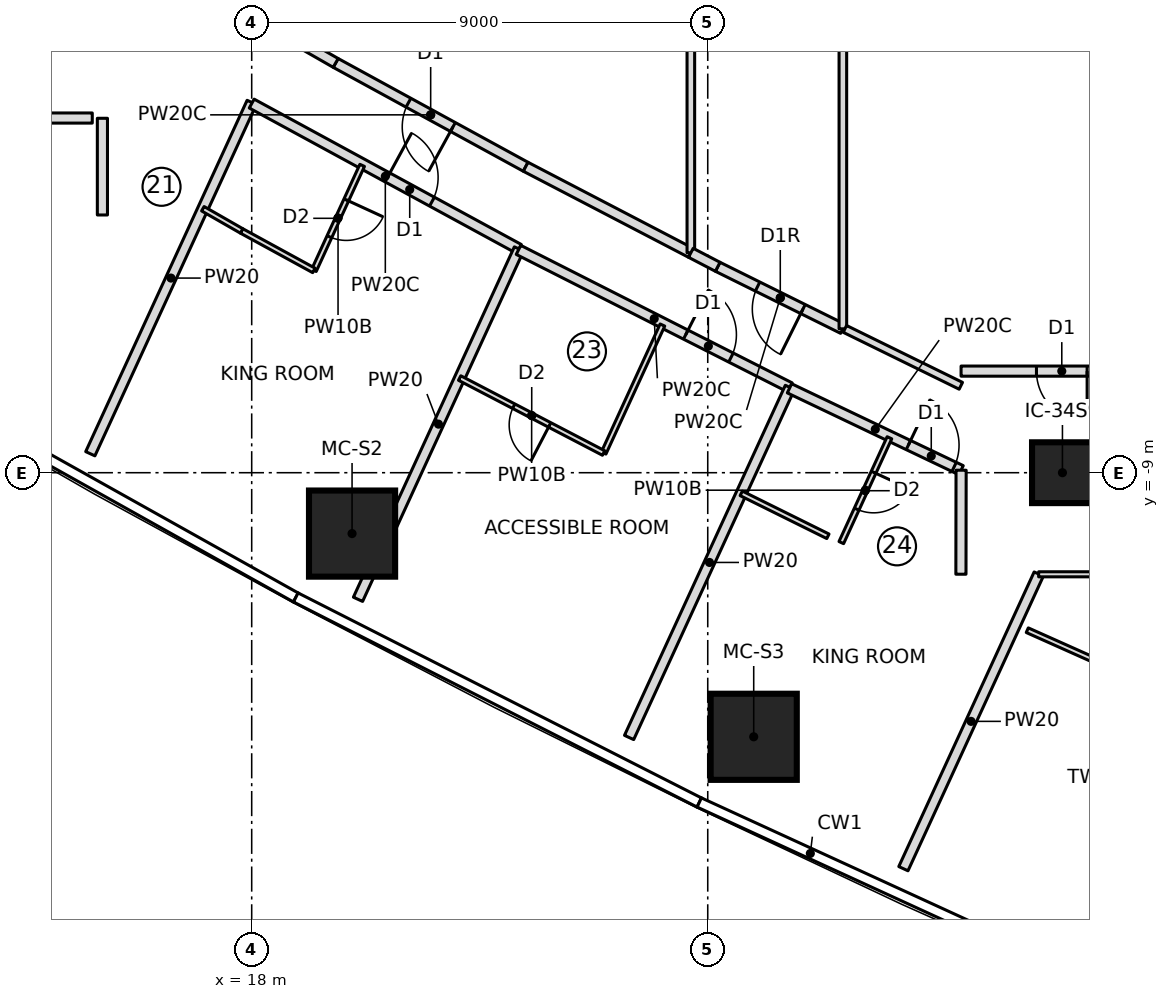
"""IFC4 building model, lengths in metres.
Left out: names, types, materials, properties, quantities, classifications, styles, units other than length and angle.
Written with IfcOpenShell. Run it as: python <this file> out.ifc"""

import sys

from ifc_helpers import new_model, si_unit, direction, frame, frame_2d, origin, origin_2d, place, context, subcontext, project, spatial, rectangle, extrude, element, fill, save


model = new_model("IFC4")
c1 = context("Model", 3, precision=1e-05, world=origin(), true_north=direction((0.0, 1.0)))
c2 = subcontext(c1, "Body", "Model", "MODEL_VIEW")
j1 = project(units=[si_unit("LENGTHUNIT", "METRE"), si_unit("PLANEANGLEUNIT", "RADIAN")], contexts=[c1])
p1 = place(None, origin())
s1 = spatial("IfcSite", under=j1, at=p1, CompositionType="ELEMENT")
p2 = place(p1, origin())
s2 = spatial("IfcBuilding", under=s1, at=p2, CompositionType="ELEMENT")
p3 = place(p2, frame((0.0, 0.0, 106.2)))
s3 = spatial("IfcBuildingStorey", under=s2, at=p3, CompositionType="ELEMENT", Elevation=106.2)
for number, where, z_axis, x_axis in (
    (1, (19.981, -10.202, 0.0), (0.0, 0.0, 1.0), (1.0, 0.0, 0.0)),
    (2, (27.907, -14.212, 0.0), (0.0, 0.0, 1.0), (1.0, 0.0, 0.0)),
):
    element("IfcColumn", number, at=place(p3, frame(where, z_axis=z_axis, x_axis=x_axis)), inside=s3, PredefinedType="COLUMN", context=c2, shape_type="SweptSolid", body=[
        extrude(rectangle(XDim=1.7, YDim=1.7, at=origin_2d()), origin(), (0.0, 0.0, 1.0), 3.55),
    ])
p4 = place(p3, frame((34.0, -9.0, 0.0), z_axis=(0.0, 0.0, 1.0), x_axis=(1.0, 0.0, 0.0)))
e3 = element("IfcColumn", 3, at=p4, inside=s3, PredefinedType="COLUMN", context=c2, shape_type="SweptSolid", body=[
    extrude(rectangle(XDim=1.2, YDim=1.2, at=origin_2d()), origin(), (0.0, 0.0, 1.0), 3.55),
])
p5 = place(p3, frame((5.145, -2.0, 0.0), z_axis=(0.0, 0.0, 1.0), x_axis=(1.0, 0.0, 0.0)))
e4 = element("IfcWall", 4, at=p5, inside=s3, PredefinedType="PARTITIONING", context=c2, shape_type="SweptSolid", body=[
    extrude(rectangle(XDim=9.709, YDim=0.2, at=frame_2d((4.854, 0.0))), origin(), (0.0, 0.0, 1.0), 3.25),
])
p6 = place(p5, frame((4.625, 0.0, 0.0)))
e5 = element("IfcOpeningElement", 5, at=p6, cuts=e4, PredefinedType="OPENING", context=c2, shape_type="SweptSolid", body=[
    extrude(rectangle(XDim=1.0, YDim=2.1, at=frame_2d((0.5, 1.05))), frame((0.0, 0.11, 0.0), z_axis=(0.0, -1.0, 0.0), x_axis=(1.0, 0.0, 0.0)), (0.0, 0.0, 1.0), 0.22),
])
p7 = place(p3, frame((14.815, -8.626, 0.0), z_axis=(0.0, 0.0, 1.0), x_axis=(0.417432341259, 0.908708006166, 0.0)))
e6 = element("IfcWall", 6, at=p7, inside=s3, PredefinedType="PARTITIONING", context=c2, shape_type="SweptSolid", body=[
    extrude(rectangle(XDim=7.631, YDim=0.2, at=frame_2d((3.815, 0.0))), origin(), (0.0, 0.0, 1.0), 3.25),
])
p8 = place(p3, frame((18.0, -1.715, 0.0), z_axis=(0.0, 0.0, 1.0), x_axis=(0.878415628048, -0.477897462225, 0.0)))
e7 = element("IfcWall", 7, at=p8, inside=s3, PredefinedType="PARTITIONING", context=c2, shape_type="SweptSolid", body=[
    extrude(rectangle(XDim=6.004, YDim=0.2, at=frame_2d((3.002, 0.0))), origin(), (0.0, 0.0, 1.0), 3.25),
])
p9 = place(p8, frame((3.05, 0.0, 0.0)))
e8 = element("IfcOpeningElement", 8, at=p9, cuts=e7, PredefinedType="OPENING", context=c2, shape_type="SweptSolid", body=[
    extrude(rectangle(XDim=1.0, YDim=2.1, at=frame_2d((0.5, 1.05))), frame((0.0, 0.11, 0.0), z_axis=(0.0, -1.0, 0.0), x_axis=(1.0, 0.0, 0.0)), (0.0, 0.0, 1.0), 0.22),
])
p10 = place(p3, frame((20.18, -2.934, 0.0), z_axis=(0.0, 0.0, 1.0), x_axis=(-0.417450047292, -0.908699872354, 0.0)))
e9 = element("IfcWall", 9, at=p10, inside=s3, PredefinedType="PARTITIONING", context=c2, shape_type="SweptSolid", body=[
    extrude(rectangle(XDim=2.283, YDim=0.1, at=frame_2d((1.141, 0.0))), origin(), (0.0, 0.0, 1.0), 3.25),
])
p11 = place(p10, frame((0.75, 0.0, 0.0)))
e10 = element("IfcOpeningElement", 10, at=p11, cuts=e9, PredefinedType="OPENING", context=c2, shape_type="SweptSolid", body=[
    extrude(rectangle(XDim=0.8, YDim=2.1, at=frame_2d((0.4, 1.05))), frame((0.0, 0.06, 0.0), z_axis=(0.0, -1.0, 0.0), x_axis=(1.0, 0.0, 0.0)), (0.0, 0.0, 1.0), 0.12),
])
p12 = place(p3, frame((19.228, -5.008, 0.0), z_axis=(0.0, 0.0, 1.0), x_axis=(-0.877424481957, 0.479714788663, 0.0)))
e11 = element("IfcWall", 11, at=p12, inside=s3, PredefinedType="PARTITIONING", context=c2, shape_type="SweptSolid", body=[
    extrude(rectangle(XDim=1.625, YDim=0.1, at=frame_2d((0.813, 0.0))), origin(), (0.0, 0.0, 1.0), 3.25),
])
p13 = place(p3, frame((17.801, -4.229, 0.0), z_axis=(0.0, 0.0, 1.0), x_axis=(-0.867629162742, 0.497211862248, 0.0)))
e12 = element("IfcWall", 12, at=p13, inside=s3, PredefinedType="PARTITIONING", context=c2, shape_type="SweptSolid", body=[
    extrude(rectangle(XDim=0.882, YDim=0.1, at=frame_2d((0.441, 0.0))), origin(), (0.0, 0.0, 1.0), 3.25),
])
p14 = place(p3, frame((20.098, -11.499, 0.0), z_axis=(0.0, 0.0, 1.0), x_axis=(0.417440028355, 0.908704474913, 0.0)))
e13 = element("IfcWall", 13, at=p14, inside=s3, PredefinedType="PARTITIONING", context=c2, shape_type="SweptSolid", body=[
    extrude(rectangle(XDim=7.61, YDim=0.2, at=frame_2d((3.805, 0.0))), origin(), (0.0, 0.0, 1.0), 3.25),
])
p15 = place(p3, frame((23.266, -4.602, 0.0), z_axis=(0.0, 0.0, 1.0), x_axis=(0.892007141151, -0.452021304958, 0.0)))
e14 = element("IfcWall", 14, at=p15, inside=s3, PredefinedType="PARTITIONING", context=c2, shape_type="SweptSolid", body=[
    extrude(rectangle(XDim=6.004, YDim=0.2, at=frame_2d((3.002, 0.0))), origin(), (0.0, 0.0, 1.0), 3.25),
])
p16 = place(p15, frame((3.7, 0.0, 0.0)))
e15 = element("IfcOpeningElement", 15, at=p16, cuts=e14, PredefinedType="OPENING", context=c2, shape_type="SweptSolid", body=[
    extrude(rectangle(XDim=1.0, YDim=2.1, at=frame_2d((0.5, 1.05))), frame((0.0, 0.11, 0.0), z_axis=(0.0, -1.0, 0.0), x_axis=(1.0, 0.0, 0.0)), (0.0, 0.0, 1.0), 0.22),
])
p17 = place(p3, frame((26.106, -6.085, 0.0), z_axis=(0.0, 0.0, 1.0), x_axis=(-0.417431588167, -0.908708352113, 0.0)))
e16 = element("IfcWall", 16, at=p17, inside=s3, PredefinedType="PARTITIONING", context=c2, shape_type="SweptSolid", body=[
    extrude(rectangle(XDim=2.781, YDim=0.1, at=frame_2d((1.39, 0.0))), origin(), (0.0, 0.0, 1.0), 3.25),
])
p18 = place(p3, frame((24.945, -8.612, 0.0), z_axis=(0.0, 0.0, 1.0), x_axis=(-0.886865947566, 0.46202682936, 0.0)))
e17 = element("IfcWall", 17, at=p18, inside=s3, PredefinedType="PARTITIONING", context=c2, shape_type="SweptSolid", body=[
    extrude(rectangle(XDim=3.204, YDim=0.1, at=frame_2d((1.602, 0.0))), origin(), (0.0, 0.0, 1.0), 3.25),
])
p19 = place(p18, frame((1.2, 0.0, 0.0)))
e18 = element("IfcOpeningElement", 18, at=p19, cuts=e17, PredefinedType="OPENING", context=c2, shape_type="SweptSolid", body=[
    extrude(rectangle(XDim=0.8, YDim=2.1, at=frame_2d((0.4, 1.05))), frame((0.0, 0.06, 0.0), z_axis=(0.0, -1.0, 0.0), x_axis=(1.0, 0.0, 0.0)), (0.0, 0.0, 1.0), 0.12),
])
p20 = place(p3, frame((25.448, -14.226, 0.0), z_axis=(0.0, 0.0, 1.0), x_axis=(0.417428513692, 0.908709764422, 0.0)))
e19 = element("IfcWall", 19, at=p20, inside=s3, PredefinedType="PARTITIONING", context=c2, shape_type="SweptSolid", body=[
    extrude(rectangle(XDim=7.603, YDim=0.2, at=frame_2d((3.802, 0.0))), origin(), (0.0, 0.0, 1.0), 3.25),
])
p21 = place(p3, frame((28.613, -7.335, 0.0), z_axis=(0.0, 0.0, 1.0), x_axis=(0.902499429765, -0.430691048518, 0.0)))
e20 = element("IfcWall", 20, at=p21, inside=s3, PredefinedType="PARTITIONING", context=c2, shape_type="SweptSolid", body=[
    extrude(rectangle(XDim=3.753, YDim=0.2, at=frame_2d((1.876, 0.0))), origin(), (0.0, 0.0, 1.0), 3.25),
])
p22 = place(p21, frame((2.6, 0.0, 0.0)))
e21 = element("IfcOpeningElement", 21, at=p22, cuts=e20, PredefinedType="OPENING", context=c2, shape_type="SweptSolid", body=[
    extrude(rectangle(XDim=1.0, YDim=2.1, at=frame_2d((0.5, 1.05))), frame((0.0, 0.11, 0.0), z_axis=(0.0, -1.0, 0.0), x_axis=(1.0, 0.0, 0.0)), (0.0, 0.0, 1.0), 0.22),
])
p23 = place(p3, frame((30.586, -8.31, 0.0), z_axis=(0.0, 0.0, 1.0), x_axis=(-0.417466676952, -0.908692232626, 0.0)))
e22 = element("IfcWall", 22, at=p23, inside=s3, PredefinedType="PARTITIONING", context=c2, shape_type="SweptSolid", body=[
    extrude(rectangle(XDim=2.277, YDim=0.1, at=frame_2d((1.139, 0.0))), origin(), (0.0, 0.0, 1.0), 3.25),
])
p24 = place(p23, frame((0.75, 0.0, 0.0)))
e23 = element("IfcOpeningElement", 23, at=p24, cuts=e22, PredefinedType="OPENING", context=c2, shape_type="SweptSolid", body=[
    extrude(rectangle(XDim=0.8, YDim=2.1, at=frame_2d((0.4, 1.05))), frame((0.0, 0.06, 0.0), z_axis=(0.0, -1.0, 0.0), x_axis=(1.0, 0.0, 0.0)), (0.0, 0.0, 1.0), 0.12),
])
p25 = place(p3, frame((29.371, -10.255, 0.0), z_axis=(0.0, 0.0, 1.0), x_axis=(-0.895982200486, 0.444089964324, 0.0)))
e24 = element("IfcWall", 24, at=p25, inside=s3, PredefinedType="PARTITIONING", context=c2, shape_type="SweptSolid", body=[
    extrude(rectangle(XDim=1.909, YDim=0.1, at=frame_2d((0.954, 0.0))), origin(), (0.0, 0.0, 1.0), 3.25),
])
p26 = place(p3, frame((30.861, -16.815, 0.0), z_axis=(0.0, 0.0, 1.0), x_axis=(0.417441426461, 0.908703832651, 0.0)))
e25 = element("IfcWall", 25, at=p26, inside=s3, PredefinedType="PARTITIONING", context=c2, shape_type="SweptSolid", body=[
    extrude(rectangle(XDim=6.399, YDim=0.2, at=frame_2d((3.2, 0.0))), origin(), (0.0, 0.0, 1.0), 3.25),
])
p27 = place(p3, frame((35.354, -13.023, 0.0), z_axis=(0.0, 0.0, 1.0), x_axis=(-0.913060453705, 0.407824236504, 0.0)))
e26 = element("IfcWall", 26, at=p27, inside=s3, PredefinedType="PARTITIONING", context=c2, shape_type="SweptSolid", body=[
    extrude(rectangle(XDim=2.243, YDim=0.1, at=frame_2d((1.122, 0.0))), origin(), (0.0, 0.0, 1.0), 3.25),
])
p28 = place(p3, frame((23.407, -2.962, 0.0), z_axis=(0.0, 0.0, 1.0), x_axis=(-0.877465075585, 0.479640533242, 0.0)))
e27 = element("IfcWall", 27, at=p28, inside=s3, PredefinedType="PARTITIONING", context=c2, shape_type="SweptSolid", body=[
    extrude(rectangle(XDim=4.273, YDim=0.2, at=frame_2d((2.137, 0.0))), origin(), (0.0, 0.0, 1.0), 3.25),
])
p29 = place(p28, frame((1.636, 0.0, 0.0)))
e28 = element("IfcOpeningElement", 28, at=p29, cuts=e27, PredefinedType="OPENING", context=c2, shape_type="SweptSolid", body=[
    extrude(rectangle(XDim=1.0, YDim=2.1, at=frame_2d((0.5, 1.05))), frame((0.0, 0.11, 0.0), z_axis=(0.0, -1.0, 0.0), x_axis=(1.0, 0.0, 0.0)), (0.0, 0.0, 1.0), 0.22),
])
p30 = place(p3, frame((19.657, -0.912, 0.0), z_axis=(0.0, 0.0, 1.0), x_axis=(-0.867694156962, 0.49709843087, 0.0)))
e29 = element("IfcWall", 29, at=p30, inside=s3, PredefinedType="PARTITIONING", context=c2, shape_type="SweptSolid", body=[
    extrude(rectangle(XDim=1.835, YDim=0.2, at=frame_2d((0.918, 0.0))), origin(), (0.0, 0.0, 1.0), 3.25),
])
p31 = place(p3, frame((26.667, -4.66, 0.0), z_axis=(0.0, 0.0, 1.0), x_axis=(-0.886891405098, 0.46197796004, 0.0)))
e30 = element("IfcWall", 30, at=p31, inside=s3, PredefinedType="PARTITIONING", context=c2, shape_type="SweptSolid", body=[
    extrude(rectangle(XDim=3.676, YDim=0.2, at=frame_2d((1.838, 0.0))), origin(), (0.0, 0.0, 1.0), 3.25),
])
p32 = place(p3, frame((26.667, -4.66, 0.0), z_axis=(0.0, 0.0, 1.0), x_axis=(0.0, 1.0, 0.0)))
e31 = element("IfcWall", 31, at=p32, inside=s3, PredefinedType="PARTITIONING", context=c2, shape_type="SweptSolid", body=[
    extrude(rectangle(XDim=9.32, YDim=0.15, at=frame_2d((4.66, 0.0))), origin(), (0.0, 0.0, 1.0), 3.25),
])
p33 = place(p3, frame((29.667, -6.16, 0.0), z_axis=(0.0, 0.0, 1.0), x_axis=(-0.895945057464, 0.444164895062, 0.0)))
e32 = element("IfcWall", 32, at=p33, inside=s3, PredefinedType="PARTITIONING", context=c2, shape_type="SweptSolid", body=[
    extrude(rectangle(XDim=2.757, YDim=0.2, at=frame_2d((1.378, 0.0))), origin(), (0.0, 0.0, 1.0), 3.25),
])
p34 = place(p33, frame((0.878, 0.0, 0.0)))
e33 = element("IfcOpeningElement", 33, at=p34, cuts=e32, PredefinedType="OPENING", context=c2, shape_type="SweptSolid", body=[
    extrude(rectangle(XDim=1.0, YDim=2.1, at=frame_2d((0.5, 1.05))), frame((0.0, 0.11, 0.0), z_axis=(0.0, -1.0, 0.0), x_axis=(1.0, 0.0, 0.0)), (0.0, 0.0, 1.0), 0.22),
])
p35 = place(p3, frame((29.667, -6.16, 0.0), z_axis=(0.0, 0.0, 1.0), x_axis=(0.0, 1.0, 0.0)))
e34 = element("IfcWall", 34, at=p35, inside=s3, PredefinedType="PARTITIONING", context=c2, shape_type="SweptSolid", body=[
    extrude(rectangle(XDim=12.321, YDim=0.15, at=frame_2d((6.16, 0.0))), origin(), (0.0, 0.0, 1.0), 3.25),
])
p36 = place(p3, frame((35.975, -6.995, 0.0), z_axis=(0.0, 0.0, 1.0), x_axis=(-1.0, 0.0, 0.0)))
e35 = element("IfcWall", 35, at=p36, inside=s3, PredefinedType="PARTITIONING", context=c2, shape_type="SweptSolid", body=[
    extrude(rectangle(XDim=3.975, YDim=0.2, at=frame_2d((1.988, 0.0))), origin(), (0.0, 0.0, 1.0), 3.25),
])
p37 = place(p36, frame((1.488, 0.0, 0.0)))
e36 = element("IfcOpeningElement", 36, at=p37, cuts=e35, PredefinedType="OPENING", context=c2, shape_type="SweptSolid", body=[
    extrude(rectangle(XDim=1.0, YDim=2.1, at=frame_2d((0.5, 1.05))), frame((0.0, 0.11, 0.0), z_axis=(0.0, -1.0, 0.0), x_axis=(1.0, 0.0, 0.0)), (0.0, 0.0, 1.0), 0.22),
])
p38 = place(p3, frame((33.53, -11.005, 0.0), z_axis=(0.0, 0.0, 1.0), x_axis=(1.0, 0.0, 0.0)))
e37 = element("IfcWall", 37, at=p38, inside=s3, PredefinedType="PARTITIONING", context=c2, shape_type="SweptSolid", body=[
    extrude(rectangle(XDim=2.47, YDim=0.1, at=frame_2d((1.235, 0.0))), origin(), (0.0, 0.0, 1.0), 3.25),
])
p39 = place(p3, frame((31.995, -7.285, 0.0), z_axis=(0.0, 0.0, 1.0), x_axis=(-0.89773510237, 0.440535680702, 0.0)))
e38 = element("IfcWall", 38, at=p39, inside=s3, PredefinedType="PARTITIONING", context=c2, shape_type="SweptSolid", body=[
    extrude(rectangle(XDim=2.549, YDim=0.15, at=frame_2d((1.275, 0.0))), origin(), (0.0, 0.0, 1.0), 3.25),
])
p40 = place(p3, frame((15.054, -2.005, 0.0), z_axis=(0.0, 0.0, 1.0), x_axis=(0.0, -1.0, 0.0)))
e39 = element("IfcWall", 39, at=p40, inside=s3, PredefinedType="PARTITIONING", context=c2, shape_type="SweptSolid", body=[
    extrude(rectangle(XDim=1.908, YDim=0.2, at=frame_2d((0.954, 0.0))), origin(), (0.0, 0.0, 1.0), 3.25),
])
p41 = place(p3, frame((32.0, -8.951, 0.0), z_axis=(0.0, 0.0, 1.0), x_axis=(-0.001665276625, -0.999998613426, 0.0)))
e40 = element("IfcWall", 40, at=p41, inside=s3, PredefinedType="PARTITIONING", context=c2, shape_type="SweptSolid", body=[
    extrude(rectangle(XDim=2.052, YDim=0.2, at=frame_2d((1.026, 0.0))), origin(), (0.0, 0.0, 1.0), 3.25),
])
p42 = place(p3, frame((27.196, -4.936, 0.0), z_axis=(0.0, 0.0, 1.0), x_axis=(-0.886948968309, 0.46186743511, 0.0)))
e41 = element("IfcWall", 41, at=p42, inside=s3, PredefinedType="PARTITIONING", context=c2, shape_type="SweptSolid", body=[
    extrude(rectangle(XDim=0.597, YDim=0.2, at=frame_2d((0.299, 0.0))), origin(), (0.0, 0.0, 1.0), 3.25),
])
p43 = place(p11, origin())
e42 = element("IfcDoor", 42, at=p43, inside=s3, OperationType="SINGLE_SWING_LEFT", PredefinedType="DOOR", context=c2, shape_type="SweptSolid", body=[
    extrude(rectangle(XDim=0.8, YDim=2.1, at=frame_2d((0.4, 1.05))), frame((0.0, 0.025, 0.0), z_axis=(0.0, -1.0, 0.0), x_axis=(1.0, 0.0, 0.0)), (0.0, 0.0, 1.0), 0.05),
])
fill(e10, e42)
p44 = place(p9, origin())
e43 = element("IfcDoor", 43, at=p44, inside=s3, OperationType="SINGLE_SWING_LEFT", PredefinedType="DOOR", context=c2, shape_type="SweptSolid", body=[
    extrude(rectangle(XDim=1.0, YDim=2.1, at=frame_2d((0.5, 1.05))), frame((0.0, 0.025, 0.0), z_axis=(0.0, -1.0, 0.0), x_axis=(1.0, 0.0, 0.0)), (0.0, 0.0, 1.0), 0.05),
])
fill(e8, e43)
p45 = place(p19, origin())
e44 = element("IfcDoor", 44, at=p45, inside=s3, OperationType="SINGLE_SWING_LEFT", PredefinedType="DOOR", context=c2, shape_type="SweptSolid", body=[
    extrude(rectangle(XDim=0.8, YDim=2.1, at=frame_2d((0.4, 1.05))), frame((0.0, 0.025, 0.0), z_axis=(0.0, -1.0, 0.0), x_axis=(1.0, 0.0, 0.0)), (0.0, 0.0, 1.0), 0.05),
])
fill(e18, e44)
p46 = place(p16, origin())
e45 = element("IfcDoor", 45, at=p46, inside=s3, OperationType="SINGLE_SWING_LEFT", PredefinedType="DOOR", context=c2, shape_type="SweptSolid", body=[
    extrude(rectangle(XDim=1.0, YDim=2.1, at=frame_2d((0.5, 1.05))), frame((0.0, 0.025, 0.0), z_axis=(0.0, -1.0, 0.0), x_axis=(1.0, 0.0, 0.0)), (0.0, 0.0, 1.0), 0.05),
])
fill(e15, e45)
p47 = place(p24, origin())
e46 = element("IfcDoor", 46, at=p47, inside=s3, OperationType="SINGLE_SWING_LEFT", PredefinedType="DOOR", context=c2, shape_type="SweptSolid", body=[
    extrude(rectangle(XDim=0.8, YDim=2.1, at=frame_2d((0.4, 1.05))), frame((0.0, 0.025, 0.0), z_axis=(0.0, -1.0, 0.0), x_axis=(1.0, 0.0, 0.0)), (0.0, 0.0, 1.0), 0.05),
])
fill(e23, e46)
p48 = place(p22, origin())
e47 = element("IfcDoor", 47, at=p48, inside=s3, OperationType="SINGLE_SWING_LEFT", PredefinedType="DOOR", context=c2, shape_type="SweptSolid", body=[
    extrude(rectangle(XDim=1.0, YDim=2.1, at=frame_2d((0.5, 1.05))), frame((0.0, 0.025, 0.0), z_axis=(0.0, -1.0, 0.0), x_axis=(1.0, 0.0, 0.0)), (0.0, 0.0, 1.0), 0.05),
])
fill(e21, e47)
p49 = place(p29, origin())
e48 = element("IfcDoor", 48, at=p49, inside=s3, OperationType="SINGLE_SWING_LEFT", PredefinedType="DOOR", context=c2, shape_type="SweptSolid", body=[
    extrude(rectangle(XDim=1.0, YDim=2.1, at=frame_2d((0.5, 1.05))), frame((0.0, 0.025, 0.0), z_axis=(0.0, -1.0, 0.0), x_axis=(1.0, 0.0, 0.0)), (0.0, 0.0, 1.0), 0.05),
])
fill(e28, e48)
p50 = place(p34, origin())
e49 = element("IfcDoor", 49, at=p50, inside=s3, OperationType="SINGLE_SWING_RIGHT", PredefinedType="DOOR", context=c2, shape_type="SweptSolid", body=[
    extrude(rectangle(XDim=1.0, YDim=2.1, at=frame_2d((0.5, 1.05))), frame((0.0, 0.025, 0.0), z_axis=(0.0, -1.0, 0.0), x_axis=(1.0, 0.0, 0.0)), (0.0, 0.0, 1.0), 0.05),
])
fill(e33, e49)
p51 = place(p37, origin())
e50 = element("IfcDoor", 50, at=p51, inside=s3, OperationType="SINGLE_SWING_LEFT", PredefinedType="DOOR", context=c2, shape_type="SweptSolid", body=[
    extrude(rectangle(XDim=1.0, YDim=2.1, at=frame_2d((0.5, 1.05))), frame((0.0, 0.025, 0.0), z_axis=(0.0, -1.0, 0.0), x_axis=(1.0, 0.0, 0.0)), (0.0, 0.0, 1.0), 0.05),
])
fill(e36, e50)
save(model, sys.argv[1])
